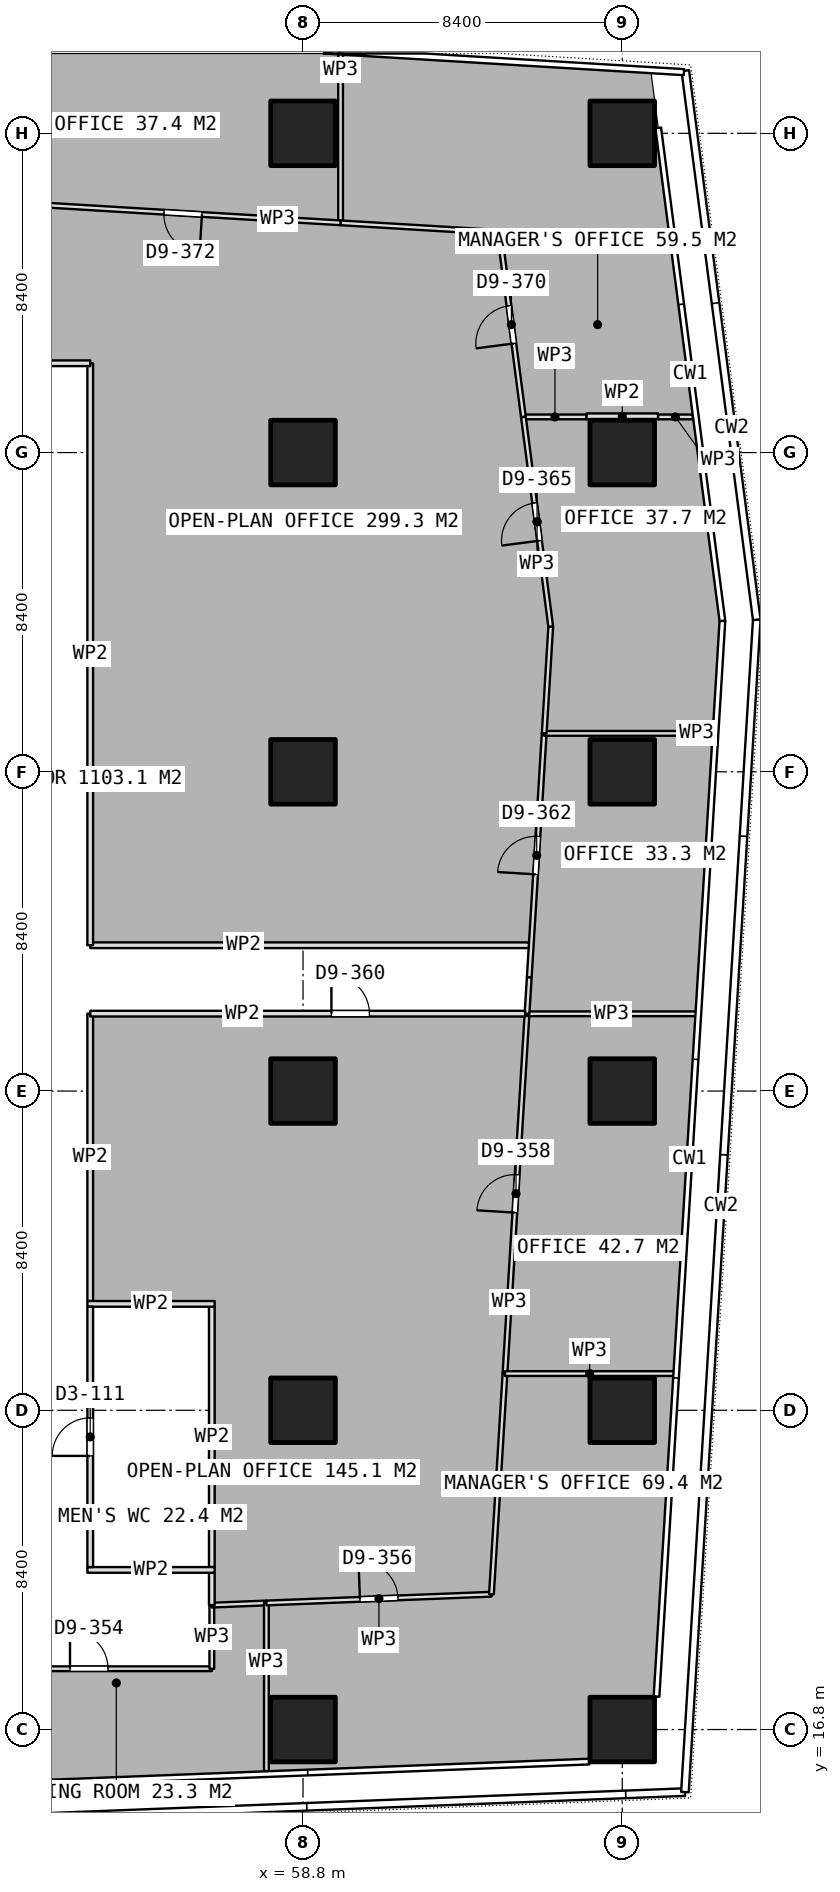
"""IFC4 building model, lengths in metres.
Left out: names, types, materials, properties, quantities, classifications, styles, units other than length and angle.
Written with IfcOpenShell. Run it as: python <this file> out.ifc"""

import sys

from ifc_helpers import new_model, si_unit, direction, frame, frame_2d, origin, origin_2d, place, context, subcontext, project, spatial, rectangle, extrude, element, fill, save


model = new_model("IFC4")
c1 = context("Model", 3, precision=1e-05, world=origin(), true_north=direction((0.0, 1.0)))
c2 = subcontext(c1, "Body", "Model", "MODEL_VIEW")
j1 = project(units=[si_unit("LENGTHUNIT", "METRE"), si_unit("PLANEANGLEUNIT", "RADIAN")], contexts=[c1])
p1 = place(None, origin())
s1 = spatial("IfcSite", under=j1, at=p1, CompositionType="ELEMENT")
p2 = place(p1, origin())
s2 = spatial("IfcBuilding", under=s1, at=p2, CompositionType="ELEMENT")
p3 = place(p2, frame((0.0, 0.0, 106.55)))
s3 = spatial("IfcBuildingStorey", under=s2, at=p3, CompositionType="ELEMENT", Elevation=106.55)
for number, where, z_axis, x_axis in (
    (1, (58.8, 16.8, 0.0), (0.0, 0.0, 1.0), (1.0, 0.0, 0.0)),
    (2, (58.8, 25.2, 0.0), (0.0, 0.0, 1.0), (1.0, 0.0, 0.0)),
    (3, (58.8, 33.6, 0.0), (0.0, 0.0, 1.0), (1.0, 0.0, 0.0)),
    (4, (58.8, 42.0, 0.0), (0.0, 0.0, 1.0), (1.0, 0.0, 0.0)),
    (5, (58.8, 50.4, 0.0), (0.0, 0.0, 1.0), (1.0, 0.0, 0.0)),
    (6, (58.8, 58.8, 0.0), (0.0, 0.0, 1.0), (1.0, 0.0, 0.0)),
    (7, (67.2, 16.8, 0.0), (0.0, 0.0, 1.0), (1.0, 0.0, 0.0)),
    (8, (67.2, 25.2, 0.0), (0.0, 0.0, 1.0), (1.0, 0.0, 0.0)),
    (9, (67.2, 33.6, 0.0), (0.0, 0.0, 1.0), (1.0, 0.0, 0.0)),
    (10, (67.2, 42.0, 0.0), (0.0, 0.0, 1.0), (1.0, 0.0, 0.0)),
    (11, (67.2, 50.4, 0.0), (0.0, 0.0, 1.0), (1.0, 0.0, 0.0)),
    (12, (67.2, 58.8, 0.0), (0.0, 0.0, 1.0), (1.0, 0.0, 0.0)),
):
    element("IfcColumn", number, at=place(p3, frame(where, z_axis=z_axis, x_axis=x_axis)), inside=s3, PredefinedType="COLUMN", context=c2, shape_type="SweptSolid", body=[
        extrude(rectangle(XDim=1.7, YDim=1.7, at=origin_2d()), origin(), (0.0, 0.0, 1.0), 3.75),
    ])
for number, where, z_axis, x_axis in (
    (13, (53.125, 21.0, 0.0), (0.0, 0.0, 1.0), (1.0, 0.0, 0.0)),
    (14, (53.125, 28.0, 0.0), (0.0, 0.0, 1.0), (1.0, 0.0, 0.0)),
):
    element("IfcWall", number, at=place(p3, frame(where, z_axis=z_axis, x_axis=x_axis)), inside=s3, PredefinedType="PARTITIONING", context=c2, shape_type="SweptSolid", body=[
        extrude(rectangle(XDim=3.35, YDim=0.15, at=frame_2d((1.675, 0.0))), origin(), (0.0, 0.0, 1.0), 3.5),
    ])
p4 = place(p3, frame((53.2, 21.075, 0.0), z_axis=(0.0, 0.0, 1.0), x_axis=(0.0, 1.0, 0.0)))
e15 = element("IfcWall", 15, at=p4, inside=s3, PredefinedType="PARTITIONING", context=c2, shape_type="SweptSolid", body=[
    extrude(rectangle(XDim=6.85, YDim=0.15, at=frame_2d((3.425, 0.0))), origin(), (0.0, 0.0, 1.0), 3.5),
])
p5 = place(p4, frame((2.925, 0.0, 0.0)))
e16 = element("IfcOpeningElement", 16, at=p5, cuts=e15, PredefinedType="OPENING", context=c2, shape_type="SweptSolid", body=[
    extrude(rectangle(XDim=1.0, YDim=2.1, at=frame_2d((0.5, 1.05))), frame((0.0, 0.085, 0.0), z_axis=(0.0, -1.0, 0.0), x_axis=(1.0, 0.0, 0.0)), (0.0, 0.0, 1.0), 0.17),
])
p6 = place(p3, frame((56.4, 21.075, 0.0), z_axis=(0.0, 0.0, 1.0), x_axis=(0.0, 1.0, 0.0)))
e17 = element("IfcWall", 17, at=p6, inside=s3, PredefinedType="PARTITIONING", context=c2, shape_type="SweptSolid", body=[
    extrude(rectangle(XDim=6.85, YDim=0.15, at=frame_2d((3.425, 0.0))), origin(), (0.0, 0.0, 1.0), 3.5),
])
p7 = place(p3, frame((49.937, 18.4, 0.0), z_axis=(0.0, 0.0, 1.0), x_axis=(1.0, 0.0, 0.0)))
e18 = element("IfcWall", 18, at=p7, inside=s3, PredefinedType="PARTITIONING", context=c2, shape_type="SweptSolid", body=[
    extrude(rectangle(XDim=6.463, YDim=0.125, at=frame_2d((3.231, 0.0))), origin(), (0.0, 0.0, 1.0), 3.5),
])
p8 = place(p7, frame((2.731, 0.0, 0.0)))
e19 = element("IfcOpeningElement", 19, at=p8, cuts=e18, PredefinedType="OPENING", context=c2, shape_type="SweptSolid", body=[
    extrude(rectangle(XDim=1.0, YDim=2.1, at=frame_2d((0.5, 1.05))), frame((0.0, 0.073, 0.0), z_axis=(0.0, -1.0, 0.0), x_axis=(1.0, 0.0, 0.0)), (0.0, 0.0, 1.0), 0.145),
])
p9 = place(p3, frame((56.4, 18.4, 0.0), z_axis=(0.0, 0.0, 1.0), x_axis=(0.0, 1.0, 0.0)))
e20 = element("IfcWall", 20, at=p9, inside=s3, PredefinedType="PARTITIONING", context=c2, shape_type="SweptSolid", body=[
    extrude(rectangle(XDim=1.674, YDim=0.125, at=frame_2d((0.837, 0.0))), origin(), (0.0, 0.0, 1.0), 3.5),
])
p10 = place(p3, frame((56.4, 20.074, 0.0), z_axis=(0.0, 0.0, 1.0), x_axis=(0.999242997058, 0.038902864047, 0.0)))
e21 = element("IfcWall", 21, at=p10, inside=s3, PredefinedType="PARTITIONING", context=c2, shape_type="SweptSolid", body=[
    extrude(rectangle(XDim=1.437, YDim=0.125, at=frame_2d((0.719, 0.0))), origin(), (0.0, 0.0, 1.0), 3.5),
])
p11 = place(p3, frame((57.836, 20.13, 0.0), z_axis=(0.0, 0.0, 1.0), x_axis=(0.0, -1.0, 0.0)))
e22 = element("IfcWall", 22, at=p11, inside=s3, PredefinedType="PARTITIONING", context=c2, shape_type="SweptSolid", body=[
    extrude(rectangle(XDim=4.424, YDim=0.125, at=frame_2d((2.212, 0.0))), origin(), (0.0, 0.0, 1.0), 3.5),
])
p12 = place(p3, frame((57.837, 20.13, 0.0), z_axis=(0.0, 0.0, 1.0), x_axis=(0.999244959279, 0.038852430487, 0.0)))
e23 = element("IfcWall", 23, at=p12, inside=s3, PredefinedType="PARTITIONING", context=c2, shape_type="SweptSolid", body=[
    extrude(rectangle(XDim=5.926, YDim=0.125, at=frame_2d((2.963, 0.0))), origin(), (0.0, 0.0, 1.0), 3.5),
])
p13 = place(p12, frame((2.463, 0.0, 0.0)))
e24 = element("IfcOpeningElement", 24, at=p13, cuts=e23, PredefinedType="OPENING", context=c2, shape_type="SweptSolid", body=[
    extrude(rectangle(XDim=1.0, YDim=2.1, at=frame_2d((0.5, 1.05))), frame((0.0, 0.073, 0.0), z_axis=(0.0, -1.0, 0.0), x_axis=(1.0, 0.0, 0.0)), (0.0, 0.0, 1.0), 0.145),
])
p14 = place(p3, frame((63.758, 20.36, 0.0), z_axis=(0.0, 0.0, 1.0), x_axis=(0.06119454608, 0.99812585756, 0.0)))
e25 = element("IfcWall", 25, at=p14, inside=s3, PredefinedType="PARTITIONING", context=c2, shape_type="SweptSolid", body=[
    extrude(rectangle(XDim=5.817, YDim=0.125, at=frame_2d((2.908, 0.0))), origin(), (0.0, 0.0, 1.0), 3.5),
])
p15 = place(p3, frame((64.114, 26.166, 0.0), z_axis=(0.0, 0.0, 1.0), x_axis=(1.0, 0.0, 0.0)))
e26 = element("IfcWall", 26, at=p15, inside=s3, PredefinedType="PARTITIONING", context=c2, shape_type="SweptSolid", body=[
    extrude(rectangle(XDim=4.458, YDim=0.125, at=frame_2d((2.229, 0.0))), origin(), (0.0, 0.0, 1.0), 3.5),
])
p16 = place(p3, frame((64.114, 26.167, 0.0), z_axis=(0.0, 0.0, 1.0), x_axis=(0.061165020441, 0.998127667322, 0.0)))
e27 = element("IfcWall", 27, at=p16, inside=s3, PredefinedType="PARTITIONING", context=c2, shape_type="SweptSolid", body=[
    extrude(rectangle(XDim=9.484, YDim=0.125, at=frame_2d((4.742, 0.0))), origin(), (0.0, 0.0, 1.0), 3.5),
])
p17 = place(p16, frame((4.242, 0.0, 0.0)))
e28 = element("IfcOpeningElement", 28, at=p17, cuts=e27, PredefinedType="OPENING", context=c2, shape_type="SweptSolid", body=[
    extrude(rectangle(XDim=1.0, YDim=2.1, at=frame_2d((0.5, 1.05))), frame((0.0, 0.073, 0.0), z_axis=(0.0, -1.0, 0.0), x_axis=(1.0, 0.0, 0.0)), (0.0, 0.0, 1.0), 0.145),
])
p18 = place(p3, frame((64.694, 35.633, 0.0), z_axis=(0.0, 0.0, 1.0), x_axis=(1.0, 0.0, 0.0)))
e29 = element("IfcWall", 29, at=p18, inside=s3, PredefinedType="PARTITIONING", context=c2, shape_type="SweptSolid", body=[
    extrude(rectangle(XDim=4.458, YDim=0.125, at=frame_2d((2.229, 0.0))), origin(), (0.0, 0.0, 1.0), 3.5),
])
p19 = place(p3, frame((64.753, 36.589, 0.0), z_axis=(0.0, 0.0, 1.0), x_axis=(0.061083835669, 0.998132638991, 0.0)))
e30 = element("IfcWall", 30, at=p19, inside=s3, PredefinedType="PARTITIONING", context=c2, shape_type="SweptSolid", body=[
    extrude(rectangle(XDim=6.435, YDim=0.125, at=frame_2d((3.217, 0.0))), origin(), (0.0, 0.0, 1.0), 3.5),
])
p20 = place(p19, frame((2.718, 0.0, 0.0)))
e31 = element("IfcOpeningElement", 31, at=p20, cuts=e30, PredefinedType="OPENING", context=c2, shape_type="SweptSolid", body=[
    extrude(rectangle(XDim=1.0, YDim=2.1, at=frame_2d((0.5, 1.05))), frame((0.0, 0.073, 0.0), z_axis=(0.0, -1.0, 0.0), x_axis=(1.0, 0.0, 0.0)), (0.0, 0.0, 1.0), 0.145),
])
p21 = place(p3, frame((65.146, 43.012, 0.0), z_axis=(0.0, 0.0, 1.0), x_axis=(1.0, 0.0, 0.0)))
e32 = element("IfcWall", 32, at=p21, inside=s3, PredefinedType="PARTITIONING", context=c2, shape_type="SweptSolid", body=[
    extrude(rectangle(XDim=4.458, YDim=0.125, at=frame_2d((2.229, 0.0))), origin(), (0.0, 0.0, 1.0), 3.5),
])
p22 = place(p3, frame((64.694, 35.634, 0.0), z_axis=(0.0, 0.0, 1.0), x_axis=(0.061488745964, 0.998107776806, 0.0)))
e33 = element("IfcWall", 33, at=p22, inside=s3, PredefinedType="PARTITIONING", context=c2, shape_type="SweptSolid", body=[
    extrude(rectangle(XDim=0.957, YDim=0.125, at=frame_2d((0.479, 0.0))), origin(), (0.0, 0.0, 1.0), 3.5),
])
p23 = place(p3, frame((64.599, 51.338, 0.0), z_axis=(0.0, 0.0, 1.0), x_axis=(1.0, 0.0, 0.0)))
e34 = element("IfcWall", 34, at=p23, inside=s3, PredefinedType="PARTITIONING", context=c2, shape_type="SweptSolid", body=[
    extrude(rectangle(XDim=1.661, YDim=0.125, at=frame_2d((0.831, 0.0))), origin(), (0.0, 0.0, 1.0), 3.5),
])
p24 = place(p3, frame((68.14, 51.338, 0.0), z_axis=(0.0, 0.0, 1.0), x_axis=(1.0, 0.0, 0.0)))
e35 = element("IfcWall", 35, at=p24, inside=s3, PredefinedType="PARTITIONING", context=c2, shape_type="SweptSolid", body=[
    extrude(rectangle(XDim=0.917, YDim=0.125, at=frame_2d((0.458, 0.0))), origin(), (0.0, 0.0, 1.0), 3.5),
])
p25 = place(p3, frame((65.146, 43.013, 0.0), z_axis=(0.0, 0.0, 1.0), x_axis=(0.061242528703, 0.998122914614, 0.0)))
e36 = element("IfcWall", 36, at=p25, inside=s3, PredefinedType="PARTITIONING", context=c2, shape_type="SweptSolid", body=[
    extrude(rectangle(XDim=2.811, YDim=0.125, at=frame_2d((1.405, 0.0))), origin(), (0.0, 0.0, 1.0), 3.5),
])
p26 = place(p3, frame((65.318, 45.818, 0.0), z_axis=(0.0, 0.0, 1.0), x_axis=(-0.129166678345, 0.991622896673, 0.0)))
e37 = element("IfcWall", 37, at=p26, inside=s3, PredefinedType="PARTITIONING", context=c2, shape_type="SweptSolid", body=[
    extrude(rectangle(XDim=5.566, YDim=0.125, at=frame_2d((2.783, 0.0))), origin(), (0.0, 0.0, 1.0), 3.5),
])
p27 = place(p26, frame((2.283, 0.0, 0.0)))
e38 = element("IfcOpeningElement", 38, at=p27, cuts=e37, PredefinedType="OPENING", context=c2, shape_type="SweptSolid", body=[
    extrude(rectangle(XDim=1.0, YDim=2.1, at=frame_2d((0.5, 1.05))), frame((0.0, 0.073, 0.0), z_axis=(0.0, -1.0, 0.0), x_axis=(1.0, 0.0, 0.0)), (0.0, 0.0, 1.0), 0.145),
])
p28 = place(p3, frame((59.788, 56.445, 0.0), z_axis=(0.0, 0.0, 1.0), x_axis=(0.0, 1.0, 0.0)))
e39 = element("IfcWall", 39, at=p28, inside=s3, PredefinedType="PARTITIONING", context=c2, shape_type="SweptSolid", body=[
    extrude(rectangle(XDim=4.458, YDim=0.125, at=frame_2d((2.229, 0.0))), origin(), (0.0, 0.0, 1.0), 3.5),
])
p29 = place(p3, frame((64.599, 51.339, 0.0), z_axis=(0.0, 0.0, 1.0), x_axis=(-0.129102549566, 0.991631247841, 0.0)))
e40 = element("IfcWall", 40, at=p29, inside=s3, PredefinedType="PARTITIONING", context=c2, shape_type="SweptSolid", body=[
    extrude(rectangle(XDim=4.896, YDim=0.125, at=frame_2d((2.448, 0.0))), origin(), (0.0, 0.0, 1.0), 3.5),
])
p30 = place(p29, frame((1.948, 0.0, 0.0)))
e41 = element("IfcOpeningElement", 41, at=p30, cuts=e40, PredefinedType="OPENING", context=c2, shape_type="SweptSolid", body=[
    extrude(rectangle(XDim=1.0, YDim=2.1, at=frame_2d((0.5, 1.05))), frame((0.0, 0.073, 0.0), z_axis=(0.0, -1.0, 0.0), x_axis=(1.0, 0.0, 0.0)), (0.0, 0.0, 1.0), 0.145),
])
p31 = place(p3, frame((63.967, 56.194, 0.0), z_axis=(0.0, 0.0, 1.0), x_axis=(-0.998201427139, 0.059949235678, 0.0)))
e42 = element("IfcWall", 42, at=p31, inside=s3, PredefinedType="PARTITIONING", context=c2, shape_type="SweptSolid", body=[
    extrude(rectangle(XDim=4.187, YDim=0.125, at=frame_2d((2.093, 0.0))), origin(), (0.0, 0.0, 1.0), 3.5),
])
p32 = place(p3, frame((59.787, 56.445, 0.0), z_axis=(0.0, 0.0, 1.0), x_axis=(-0.998194005673, 0.060072681298, 0.0)))
e43 = element("IfcWall", 43, at=p32, inside=s3, PredefinedType="PARTITIONING", context=c2, shape_type="SweptSolid", body=[
    extrude(rectangle(XDim=8.307, YDim=0.125, at=frame_2d((4.153, 0.0))), origin(), (0.0, 0.0, 1.0), 3.5),
])
p33 = place(p32, frame((3.654, 0.0, 0.0)))
e44 = element("IfcOpeningElement", 44, at=p33, cuts=e43, PredefinedType="OPENING", context=c2, shape_type="SweptSolid", body=[
    extrude(rectangle(XDim=1.0, YDim=2.1, at=frame_2d((0.5, 1.05))), frame((0.0, 0.073, 0.0), z_axis=(0.0, -1.0, 0.0), x_axis=(1.0, 0.0, 0.0)), (0.0, 0.0, 1.0), 0.145),
])
p34 = place(p3, frame((66.26, 51.355, 0.0), z_axis=(0.0, 0.0, 1.0), x_axis=(1.0, 0.0, 0.0)))
e45 = element("IfcWall", 45, at=p34, inside=s3, PredefinedType="PARTITIONING", context=c2, shape_type="SweptSolid", body=[
    extrude(rectangle(XDim=1.88, YDim=0.15, at=frame_2d((0.94, 0.0))), origin(), (0.0, 0.0, 1.0), 3.5),
])
p35 = place(p3, frame((64.742, 37.437, 0.0), z_axis=(0.0, 0.0, 1.0), x_axis=(-1.0, 0.0, 0.0)))
e46 = element("IfcWall", 46, at=p35, inside=s3, PredefinedType="PARTITIONING", context=c2, shape_type="SweptSolid", body=[
    extrude(rectangle(XDim=11.542, YDim=0.15, at=frame_2d((5.771, 0.0))), origin(), (0.0, 0.0, 1.0), 3.5),
])
p36 = place(p3, frame((53.2, 37.437, 0.0), z_axis=(0.0, 0.0, 1.0), x_axis=(0.0, 1.0, 0.0)))
e47 = element("IfcWall", 47, at=p36, inside=s3, PredefinedType="PARTITIONING", context=c2, shape_type="SweptSolid", body=[
    extrude(rectangle(XDim=15.313, YDim=0.15, at=frame_2d((7.656, 0.0))), origin(), (0.0, 0.0, 1.0), 3.5),
])
p37 = place(p3, frame((53.2, 52.75, 0.0), z_axis=(0.0, 0.0, 1.0), x_axis=(-1.0, 0.0, 0.0)))
e48 = element("IfcWall", 48, at=p37, inside=s3, PredefinedType="PARTITIONING", context=c2, shape_type="SweptSolid", body=[
    extrude(rectangle(XDim=17.574, YDim=0.15, at=frame_2d((8.787, 0.0))), origin(), (0.0, 0.0, 1.0), 3.5),
])
p38 = place(p37, frame((8.287, 0.0, 0.0)))
e49 = element("IfcOpeningElement", 49, at=p38, cuts=e48, PredefinedType="OPENING", context=c2, shape_type="SweptSolid", body=[
    extrude(rectangle(XDim=1.0, YDim=2.1, at=frame_2d((0.5, 1.05))), frame((0.0, 0.085, 0.0), z_axis=(0.0, -1.0, 0.0), x_axis=(1.0, 0.0, 0.0)), (0.0, 0.0, 1.0), 0.17),
])
p39 = place(p3, frame((56.4, 20.074, 0.0), z_axis=(0.0, 0.0, 1.0), x_axis=(0.0, 1.0, 0.0)))
e50 = element("IfcWall", 50, at=p39, inside=s3, PredefinedType="PARTITIONING", context=c2, shape_type="SweptSolid", body=[
    extrude(rectangle(XDim=0.851, YDim=0.15, at=frame_2d((0.426, 0.0))), origin(), (0.0, 0.0, 1.0), 3.5),
])
p40 = place(p3, frame((53.2, 28.075, 0.0), z_axis=(0.0, 0.0, 1.0), x_axis=(0.0, 1.0, 0.0)))
e51 = element("IfcWall", 51, at=p40, inside=s3, PredefinedType="PARTITIONING", context=c2, shape_type="SweptSolid", body=[
    extrude(rectangle(XDim=7.562, YDim=0.15, at=frame_2d((3.781, 0.0))), origin(), (0.0, 0.0, 1.0), 3.5),
])
p41 = place(p3, frame((53.2, 35.637, 0.0), z_axis=(0.0, 0.0, 1.0), x_axis=(1.0, 0.0, 0.0)))
e52 = element("IfcWall", 52, at=p41, inside=s3, PredefinedType="PARTITIONING", context=c2, shape_type="SweptSolid", body=[
    extrude(rectangle(XDim=11.445, YDim=0.15, at=frame_2d((5.723, 0.0))), origin(), (0.0, 0.0, 1.0), 3.5),
])
p42 = place(p41, frame((6.347, 0.0, 0.0)))
e53 = element("IfcOpeningElement", 53, at=p42, cuts=e52, PredefinedType="OPENING", context=c2, shape_type="SweptSolid", body=[
    extrude(rectangle(XDim=1.0, YDim=2.1, at=frame_2d((0.5, 1.05))), frame((0.0, 0.085, 0.0), z_axis=(0.0, -1.0, 0.0), x_axis=(1.0, 0.0, 0.0)), (0.0, 0.0, 1.0), 0.17),
])
p43 = place(p5, origin())
e54 = element("IfcDoor", 54, at=p43, inside=s3, OperationType="SINGLE_SWING_LEFT", PredefinedType="DOOR", context=c2, shape_type="SweptSolid", body=[
    extrude(rectangle(XDim=1.0, YDim=2.1, at=frame_2d((0.5, 1.05))), frame((0.0, 0.025, 0.0), z_axis=(0.0, -1.0, 0.0), x_axis=(1.0, 0.0, 0.0)), (0.0, 0.0, 1.0), 0.05),
])
fill(e16, e54)
p44 = place(p8, origin())
e55 = element("IfcDoor", 55, at=p44, inside=s3, OperationType="SINGLE_SWING_LEFT", PredefinedType="DOOR", context=c2, shape_type="SweptSolid", body=[
    extrude(rectangle(XDim=1.0, YDim=2.1, at=frame_2d((0.5, 1.05))), frame((0.0, 0.025, 0.0), z_axis=(0.0, -1.0, 0.0), x_axis=(1.0, 0.0, 0.0)), (0.0, 0.0, 1.0), 0.05),
])
fill(e19, e55)
p45 = place(p13, origin())
e56 = element("IfcDoor", 56, at=p45, inside=s3, OperationType="SINGLE_SWING_LEFT", PredefinedType="DOOR", context=c2, shape_type="SweptSolid", body=[
    extrude(rectangle(XDim=1.0, YDim=2.1, at=frame_2d((0.5, 1.05))), frame((0.0, 0.025, 0.0), z_axis=(0.0, -1.0, 0.0), x_axis=(1.0, 0.0, 0.0)), (0.0, 0.0, 1.0), 0.05),
])
fill(e24, e56)
p46 = place(p17, origin())
e57 = element("IfcDoor", 57, at=p46, inside=s3, OperationType="SINGLE_SWING_LEFT", PredefinedType="DOOR", context=c2, shape_type="SweptSolid", body=[
    extrude(rectangle(XDim=1.0, YDim=2.1, at=frame_2d((0.5, 1.05))), frame((0.0, 0.025, 0.0), z_axis=(0.0, -1.0, 0.0), x_axis=(1.0, 0.0, 0.0)), (0.0, 0.0, 1.0), 0.05),
])
fill(e28, e57)
p47 = place(p20, origin())
e58 = element("IfcDoor", 58, at=p47, inside=s3, OperationType="SINGLE_SWING_LEFT", PredefinedType="DOOR", context=c2, shape_type="SweptSolid", body=[
    extrude(rectangle(XDim=1.0, YDim=2.1, at=frame_2d((0.5, 1.05))), frame((0.0, 0.025, 0.0), z_axis=(0.0, -1.0, 0.0), x_axis=(1.0, 0.0, 0.0)), (0.0, 0.0, 1.0), 0.05),
])
fill(e31, e58)
p48 = place(p27, origin())
e59 = element("IfcDoor", 59, at=p48, inside=s3, OperationType="SINGLE_SWING_LEFT", PredefinedType="DOOR", context=c2, shape_type="SweptSolid", body=[
    extrude(rectangle(XDim=1.0, YDim=2.1, at=frame_2d((0.5, 1.05))), frame((0.0, 0.025, 0.0), z_axis=(0.0, -1.0, 0.0), x_axis=(1.0, 0.0, 0.0)), (0.0, 0.0, 1.0), 0.05),
])
fill(e38, e59)
p49 = place(p30, origin())
e60 = element("IfcDoor", 60, at=p49, inside=s3, OperationType="SINGLE_SWING_LEFT", PredefinedType="DOOR", context=c2, shape_type="SweptSolid", body=[
    extrude(rectangle(XDim=1.0, YDim=2.1, at=frame_2d((0.5, 1.05))), frame((0.0, 0.025, 0.0), z_axis=(0.0, -1.0, 0.0), x_axis=(1.0, 0.0, 0.0)), (0.0, 0.0, 1.0), 0.05),
])
fill(e41, e60)
p50 = place(p33, origin())
e61 = element("IfcDoor", 61, at=p50, inside=s3, OperationType="SINGLE_SWING_LEFT", PredefinedType="DOOR", context=c2, shape_type="SweptSolid", body=[
    extrude(rectangle(XDim=1.0, YDim=2.1, at=frame_2d((0.5, 1.05))), frame((0.0, 0.025, 0.0), z_axis=(0.0, -1.0, 0.0), x_axis=(1.0, 0.0, 0.0)), (0.0, 0.0, 1.0), 0.05),
])
fill(e44, e61)
p51 = place(p42, origin())
e62 = element("IfcDoor", 62, at=p51, inside=s3, OperationType="SINGLE_SWING_LEFT", PredefinedType="DOOR", context=c2, shape_type="SweptSolid", body=[
    extrude(rectangle(XDim=1.0, YDim=2.1, at=frame_2d((0.5, 1.05))), frame((0.0, 0.025, 0.0), z_axis=(0.0, -1.0, 0.0), x_axis=(1.0, 0.0, 0.0)), (0.0, 0.0, 1.0), 0.05),
])
fill(e53, e62)
save(model, sys.argv[1])
